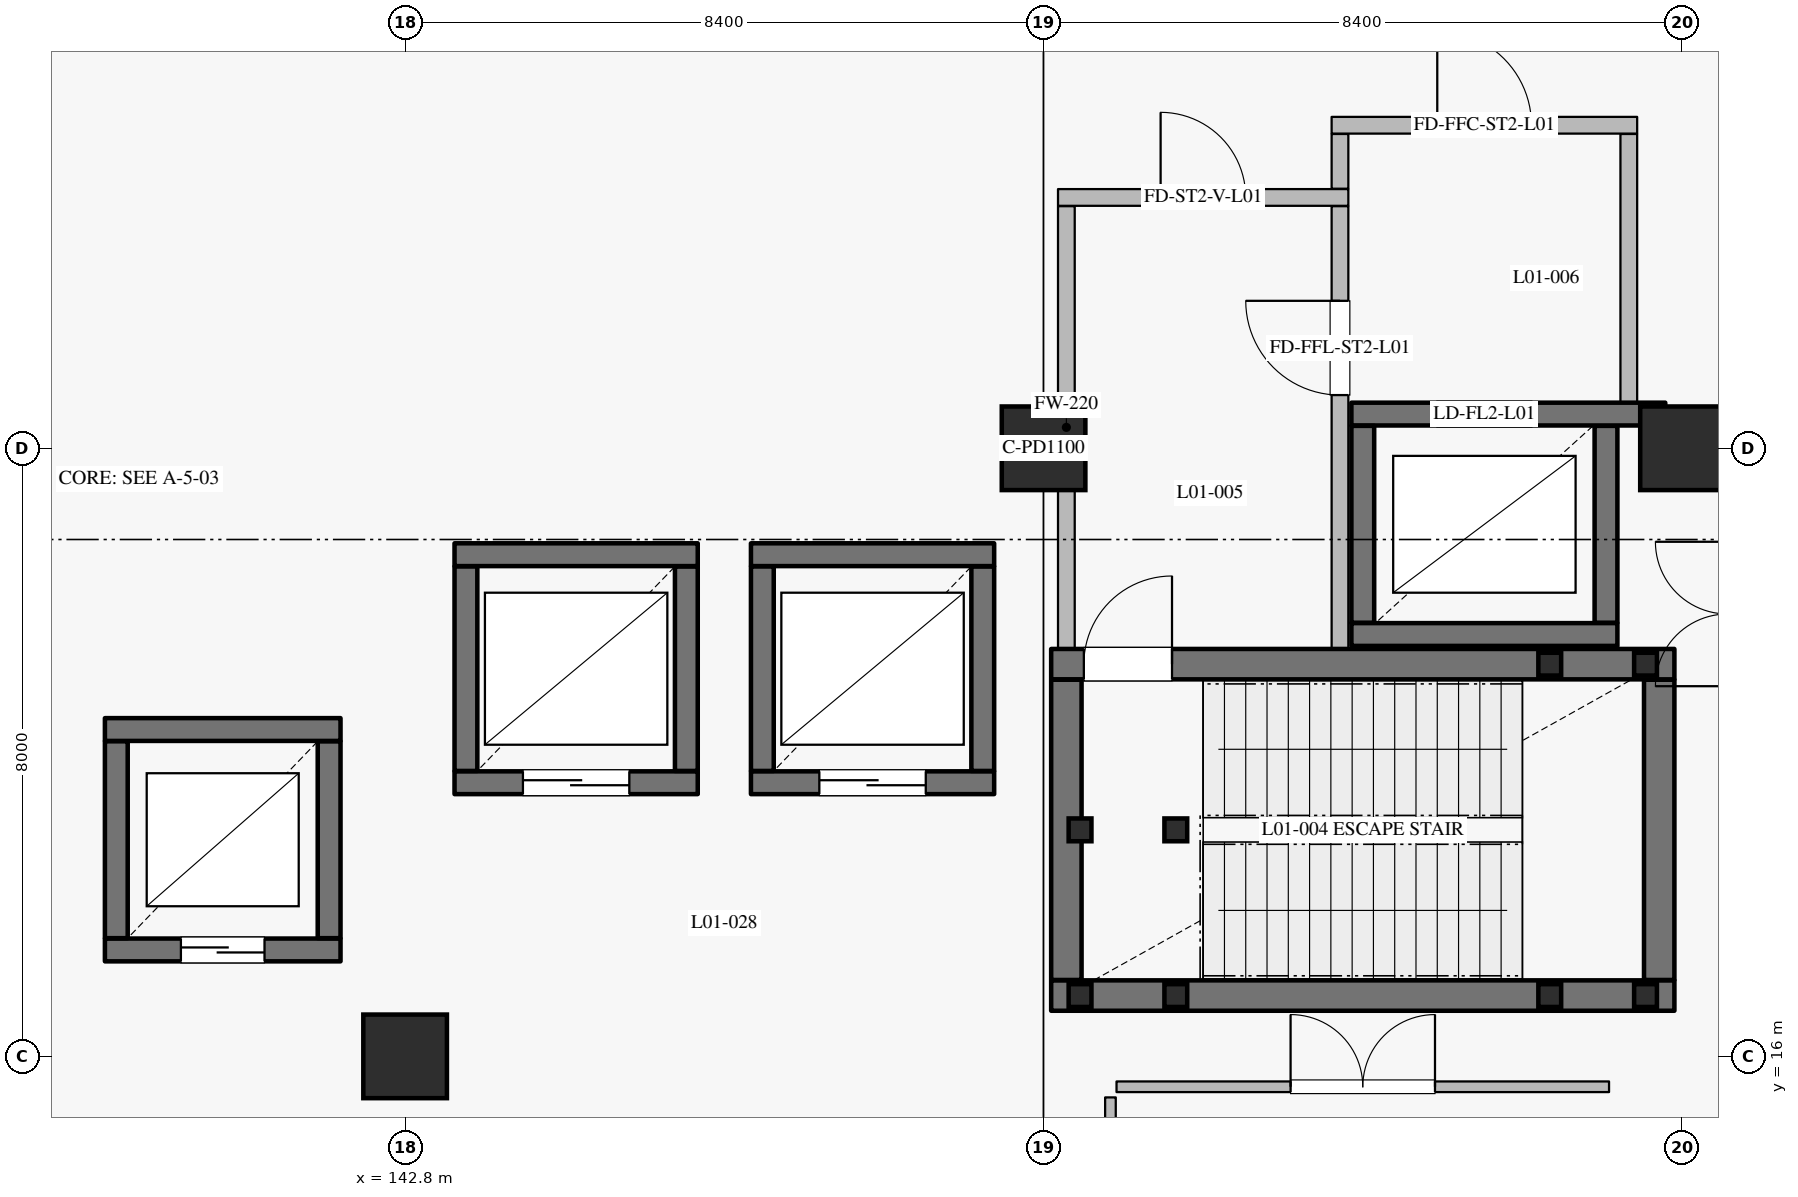
"""IFC4 building model, lengths in metres.
Left out: names, types, materials, properties, quantities, classifications, styles, units other than length and angle.
Written with IfcOpenShell. Run it as: python <this file> out.ifc"""

import sys

from ifc_helpers import new_model, si_unit, direction, frame, frame_2d, origin, origin_2d, place, context, subcontext, project, spatial, rectangle, hollow_rectangle, circle, extrude, element, fill, save


model = new_model("IFC4")
c1 = context("Model", 3, precision=1e-05, world=origin(), true_north=direction((0.0, 1.0)))
c2 = subcontext(c1, "Body", "Model", "MODEL_VIEW")
j1 = project(units=[si_unit("LENGTHUNIT", "METRE"), si_unit("PLANEANGLEUNIT", "RADIAN")], contexts=[c1])
p1 = place(None, origin())
s1 = spatial("IfcSite", under=j1, at=p1, CompositionType="ELEMENT")
p2 = place(p1, origin())
s2 = spatial("IfcBuilding", under=s1, at=p2, CompositionType="ELEMENT")
p3 = place(p2, frame((0.0, 0.0, 6.0)))
s3 = spatial("IfcBuildingStorey", under=s2, at=p3, CompositionType="ELEMENT", Elevation=6.0)
for number, where, z_axis, x_axis in (
    (1, (142.8, 16.0, 0.0), (0.0, 0.0, 1.0), (1.0, 0.0, 0.0)),
    (2, (151.2, 24.0, 0.0), (0.0, 0.0, 1.0), (1.0, 0.0, 0.0)),
    (3, (159.6, 24.0, 0.0), (0.0, 0.0, 1.0), (1.0, 0.0, 0.0)),
):
    element("IfcColumn", number, at=place(p3, frame(where, z_axis=z_axis, x_axis=x_axis)), inside=s3, PredefinedType="COLUMN", context=c2, shape_type="SweptSolid", body=[
        extrude(circle(Radius=0.55, at=origin_2d()), origin(), (0.0, 0.0, 1.0), 5.4),
    ])
p4 = place(p3, frame((138.85, 17.4, 0.0), z_axis=(0.0, 0.0, 1.0), x_axis=(1.0, 0.0, 0.0)))
e4 = element("IfcWall", 4, at=p4, inside=s3, PredefinedType="SHEAR", context=c2, shape_type="SweptSolid", body=[
    extrude(rectangle(XDim=3.1, YDim=0.3, at=frame_2d((1.55, 0.0))), origin(), (0.0, 0.0, 1.0), 5.045),
])
p5 = place(p4, frame((1.0, 0.0, 0.0)))
e5 = element("IfcOpeningElement", 5, at=p5, cuts=e4, PredefinedType="OPENING", context=c2, shape_type="SweptSolid", body=[
    extrude(rectangle(XDim=1.1, YDim=2.2, at=frame_2d((0.55, 1.1))), frame((0.0, 0.16, 0.0), z_axis=(0.0, -1.0, 0.0), x_axis=(1.0, 0.0, 0.0)), (0.0, 0.0, 1.0), 0.32),
])
p6 = place(p3, frame((141.8, 17.555, 0.0), z_axis=(0.0, 0.0, 1.0), x_axis=(0.0, 1.0, 0.0)))
e6 = element("IfcWall", 6, at=p6, inside=s3, PredefinedType="SHEAR", context=c2, shape_type="SweptSolid", body=[
    extrude(rectangle(XDim=2.59, YDim=0.3, at=frame_2d((1.295, 0.0))), origin(), (0.0, 0.0, 1.0), 5.045),
])
p7 = place(p3, frame((141.95, 20.3, 0.0), z_axis=(0.0, 0.0, 1.0), x_axis=(-1.0, 0.0, 0.0)))
e7 = element("IfcWall", 7, at=p7, inside=s3, PredefinedType="SHEAR", context=c2, shape_type="SweptSolid", body=[
    extrude(rectangle(XDim=3.1, YDim=0.3, at=frame_2d((1.55, 0.0))), origin(), (0.0, 0.0, 1.0), 5.045),
])
p8 = place(p3, frame((139.0, 20.145, 0.0), z_axis=(0.0, 0.0, 1.0), x_axis=(0.0, -1.0, 0.0)))
e8 = element("IfcWall", 8, at=p8, inside=s3, PredefinedType="SHEAR", context=c2, shape_type="SweptSolid", body=[
    extrude(rectangle(XDim=2.59, YDim=0.3, at=frame_2d((1.295, 0.0))), origin(), (0.0, 0.0, 1.0), 5.045),
])
p9 = place(p3, frame((155.25, 21.55, 0.0), z_axis=(0.0, 0.0, 1.0), x_axis=(1.0, 0.0, 0.0)))
e9 = element("IfcWall", 9, at=p9, inside=s3, PredefinedType="SHEAR", context=c2, shape_type="SweptSolid", body=[
    extrude(rectangle(XDim=3.5, YDim=0.3, at=frame_2d((1.75, 0.0))), origin(), (0.0, 0.0, 1.0), 5.045),
])
p10 = place(p3, frame((158.6, 21.705, 0.0), z_axis=(0.0, 0.0, 1.0), x_axis=(0.0, 1.0, 0.0)))
e10 = element("IfcWall", 10, at=p10, inside=s3, PredefinedType="SHEAR", context=c2, shape_type="SweptSolid", body=[
    extrude(rectangle(XDim=2.59, YDim=0.3, at=frame_2d((1.295, 0.0))), origin(), (0.0, 0.0, 1.0), 5.045),
])
p11 = place(p3, frame((159.38, 24.45, 0.0), z_axis=(0.0, 0.0, 1.0), x_axis=(-1.0, 0.0, 0.0)))
e11 = element("IfcWall", 11, at=p11, inside=s3, PredefinedType="SHEAR", context=c2, shape_type="SweptSolid", body=[
    extrude(rectangle(XDim=4.13, YDim=0.3, at=frame_2d((2.065, 0.0))), origin(), (0.0, 0.0, 1.0), 5.045),
])
p12 = place(p11, frame((1.755, 0.0, 0.0)))
e12 = element("IfcOpeningElement", 12, at=p12, cuts=e11, PredefinedType="OPENING", context=c2, shape_type="SweptSolid", body=[
    extrude(rectangle(XDim=1.25, YDim=2.25, at=frame_2d((0.625, 1.125))), frame((0.0, 0.16, 0.0), z_axis=(0.0, -1.0, 0.0), x_axis=(1.0, 0.0, 0.0)), (0.0, 0.0, 1.0), 0.32),
])
p13 = place(p3, frame((155.4, 24.295, 0.0), z_axis=(0.0, 0.0, 1.0), x_axis=(0.0, -1.0, 0.0)))
e13 = element("IfcWall", 13, at=p13, inside=s3, PredefinedType="SHEAR", context=c2, shape_type="SweptSolid", body=[
    extrude(rectangle(XDim=2.59, YDim=0.3, at=frame_2d((1.295, 0.0))), origin(), (0.0, 0.0, 1.0), 5.045),
])
p14 = place(p3, frame((143.45, 19.6, 0.0), z_axis=(0.0, 0.0, 1.0), x_axis=(1.0, 0.0, 0.0)))
e14 = element("IfcWall", 14, at=p14, inside=s3, PredefinedType="SHEAR", context=c2, shape_type="SweptSolid", body=[
    extrude(rectangle(XDim=3.2, YDim=0.3, at=frame_2d((1.6, 0.0))), origin(), (0.0, 0.0, 1.0), 5.045),
])
p15 = place(p14, frame((0.9, 0.0, 0.0)))
e15 = element("IfcOpeningElement", 15, at=p15, cuts=e14, PredefinedType="OPENING", context=c2, shape_type="SweptSolid", body=[
    extrude(rectangle(XDim=1.4, YDim=2.35, at=frame_2d((0.7, 1.175))), frame((0.0, 0.16, 0.0), z_axis=(0.0, -1.0, 0.0), x_axis=(1.0, 0.0, 0.0)), (0.0, 0.0, 1.0), 0.32),
])
p16 = place(p3, frame((146.5, 19.755, 0.0), z_axis=(0.0, 0.0, 1.0), x_axis=(0.0, 1.0, 0.0)))
e16 = element("IfcWall", 16, at=p16, inside=s3, PredefinedType="SHEAR", context=c2, shape_type="SweptSolid", body=[
    extrude(rectangle(XDim=2.69, YDim=0.3, at=frame_2d((1.345, 0.0))), origin(), (0.0, 0.0, 1.0), 5.045),
])
p17 = place(p3, frame((146.65, 22.6, 0.0), z_axis=(0.0, 0.0, 1.0), x_axis=(-1.0, 0.0, 0.0)))
e17 = element("IfcWall", 17, at=p17, inside=s3, PredefinedType="SHEAR", context=c2, shape_type="SweptSolid", body=[
    extrude(rectangle(XDim=3.2, YDim=0.3, at=frame_2d((1.6, 0.0))), origin(), (0.0, 0.0, 1.0), 5.045),
])
p18 = place(p3, frame((143.6, 22.445, 0.0), z_axis=(0.0, 0.0, 1.0), x_axis=(0.0, -1.0, 0.0)))
e18 = element("IfcWall", 18, at=p18, inside=s3, PredefinedType="SHEAR", context=c2, shape_type="SweptSolid", body=[
    extrude(rectangle(XDim=2.69, YDim=0.3, at=frame_2d((1.345, 0.0))), origin(), (0.0, 0.0, 1.0), 5.045),
])
p19 = place(p3, frame((147.35, 19.6, 0.0), z_axis=(0.0, 0.0, 1.0), x_axis=(1.0, 0.0, 0.0)))
e19 = element("IfcWall", 19, at=p19, inside=s3, PredefinedType="SHEAR", context=c2, shape_type="SweptSolid", body=[
    extrude(rectangle(XDim=3.2, YDim=0.3, at=frame_2d((1.6, 0.0))), origin(), (0.0, 0.0, 1.0), 5.045),
])
p20 = place(p19, frame((0.9, 0.0, 0.0)))
e20 = element("IfcOpeningElement", 20, at=p20, cuts=e19, PredefinedType="OPENING", context=c2, shape_type="SweptSolid", body=[
    extrude(rectangle(XDim=1.4, YDim=2.35, at=frame_2d((0.7, 1.175))), frame((0.0, 0.16, 0.0), z_axis=(0.0, -1.0, 0.0), x_axis=(1.0, 0.0, 0.0)), (0.0, 0.0, 1.0), 0.32),
])
p21 = place(p3, frame((150.4, 19.755, 0.0), z_axis=(0.0, 0.0, 1.0), x_axis=(0.0, 1.0, 0.0)))
e21 = element("IfcWall", 21, at=p21, inside=s3, PredefinedType="SHEAR", context=c2, shape_type="SweptSolid", body=[
    extrude(rectangle(XDim=2.69, YDim=0.3, at=frame_2d((1.345, 0.0))), origin(), (0.0, 0.0, 1.0), 5.045),
])
p22 = place(p3, frame((150.55, 22.6, 0.0), z_axis=(0.0, 0.0, 1.0), x_axis=(-1.0, 0.0, 0.0)))
e22 = element("IfcWall", 22, at=p22, inside=s3, PredefinedType="SHEAR", context=c2, shape_type="SweptSolid", body=[
    extrude(rectangle(XDim=3.2, YDim=0.3, at=frame_2d((1.6, 0.0))), origin(), (0.0, 0.0, 1.0), 5.045),
])
p23 = place(p3, frame((147.5, 22.445, 0.0), z_axis=(0.0, 0.0, 1.0), x_axis=(0.0, -1.0, 0.0)))
e23 = element("IfcWall", 23, at=p23, inside=s3, PredefinedType="SHEAR", context=c2, shape_type="SweptSolid", body=[
    extrude(rectangle(XDim=2.69, YDim=0.3, at=frame_2d((1.345, 0.0))), origin(), (0.0, 0.0, 1.0), 5.045),
])
p24 = place(p3, frame((151.3, 16.8, 0.0), z_axis=(0.0, 0.0, 1.0), x_axis=(1.0, 0.0, 0.0)))
e24 = element("IfcWall", 24, at=p24, inside=s3, PredefinedType="SHEAR", context=c2, shape_type="SweptSolid", body=[
    extrude(rectangle(XDim=8.2, YDim=0.4, at=frame_2d((4.1, 0.0))), origin(), (0.0, 0.0, 1.0), 5.045),
])
p25 = place(p3, frame((159.3, 17.005, 0.0), z_axis=(0.0, 0.0, 1.0), x_axis=(0.0, 1.0, 0.0)))
e25 = element("IfcWall", 25, at=p25, inside=s3, PredefinedType="SHEAR", context=c2, shape_type="SweptSolid", body=[
    extrude(rectangle(XDim=3.95, YDim=0.4, at=frame_2d((1.975, 0.0))), origin(), (0.0, 0.0, 1.0), 5.045),
])
p26 = place(p3, frame((151.3, 21.16, 0.0), z_axis=(0.0, 0.0, 1.0), x_axis=(1.0, 0.0, 0.0)))
e26 = element("IfcWall", 26, at=p26, inside=s3, PredefinedType="SHEAR", context=c2, shape_type="SweptSolid", body=[
    extrude(rectangle(XDim=8.2, YDim=0.4, at=frame_2d((4.1, 0.0))), origin(), (0.0, 0.0, 1.0), 5.045),
])
p27 = place(p26, frame((0.43, 0.0, 0.0)))
e27 = element("IfcOpeningElement", 27, at=p27, cuts=e26, PredefinedType="OPENING", context=c2, shape_type="SweptSolid", body=[
    extrude(rectangle(XDim=1.16, YDim=2.2, at=frame_2d((0.58, 1.1))), frame((0.0, 0.21, 0.0), z_axis=(0.0, -1.0, 0.0), x_axis=(1.0, 0.0, 0.0)), (0.0, 0.0, 1.0), 0.42),
])
p28 = place(p3, frame((151.5, 17.005, 0.0), z_axis=(0.0, 0.0, 1.0), x_axis=(0.0, 1.0, 0.0)))
e28 = element("IfcWall", 28, at=p28, inside=s3, PredefinedType="SHEAR", context=c2, shape_type="SweptSolid", body=[
    extrude(rectangle(XDim=3.95, YDim=0.4, at=frame_2d((1.975, 0.0))), origin(), (0.0, 0.0, 1.0), 5.045),
])
p29 = place(p3, frame((151.5, 21.365, 0.0), z_axis=(0.0, 0.0, 1.0), x_axis=(0.0, 1.0, 0.0)))
e29 = element("IfcWall", 29, at=p29, inside=s3, PredefinedType="PARTITIONING", context=c2, shape_type="SweptSolid", body=[
    extrude(rectangle(XDim=5.82, YDim=0.22, at=frame_2d((2.91, 0.0))), origin(), (0.0, 0.0, 1.0), 3.45),
])
p30 = place(p3, frame((151.39, 27.3, 0.0), z_axis=(0.0, 0.0, 1.0), x_axis=(1.0, 0.0, 0.0)))
e30 = element("IfcWall", 30, at=p30, inside=s3, PredefinedType="PARTITIONING", context=c2, shape_type="SweptSolid", body=[
    extrude(rectangle(XDim=3.82, YDim=0.22, at=frame_2d((1.91, 0.0))), origin(), (0.0, 0.0, 1.0), 5.045),
])
p31 = place(p30, frame((1.35, 0.0, 0.0)))
e31 = element("IfcOpeningElement", 31, at=p31, cuts=e30, PredefinedType="OPENING", context=c2, shape_type="SweptSolid", body=[
    extrude(rectangle(XDim=1.12, YDim=2.2, at=frame_2d((0.56, 1.1))), frame((0.0, 0.12, 0.0), z_axis=(0.0, -1.0, 0.0), x_axis=(1.0, 0.0, 0.0)), (0.0, 0.0, 1.0), 0.24),
])
p32 = place(p3, frame((155.1, 21.365, 0.0), z_axis=(0.0, 0.0, 1.0), x_axis=(0.0, 1.0, 0.0)))
e32 = element("IfcWall", 32, at=p32, inside=s3, PredefinedType="PARTITIONING", context=c2, shape_type="SweptSolid", body=[
    extrude(rectangle(XDim=5.82, YDim=0.22, at=frame_2d((2.91, 0.0))), origin(), (0.0, 0.0, 1.0), 5.045),
])
p33 = place(p32, frame((3.335, 0.0, 0.0)))
e33 = element("IfcOpeningElement", 33, at=p33, cuts=e32, PredefinedType="OPENING", context=c2, shape_type="SweptSolid", body=[
    extrude(rectangle(XDim=1.24, YDim=2.2, at=frame_2d((0.62, 1.1))), frame((0.0, 0.12, 0.0), z_axis=(0.0, -1.0, 0.0), x_axis=(1.0, 0.0, 0.0)), (0.0, 0.0, 1.0), 0.24),
])
p34 = place(p3, frame((155.1, 27.415, 0.0), z_axis=(0.0, 0.0, 1.0), x_axis=(0.0, 1.0, 0.0)))
e34 = element("IfcWall", 34, at=p34, inside=s3, PredefinedType="PARTITIONING", context=c2, shape_type="SweptSolid", body=[
    extrude(rectangle(XDim=0.72, YDim=0.22, at=frame_2d((0.36, 0.0))), origin(), (0.0, 0.0, 1.0), 5.045),
])
p35 = place(p3, frame((158.9, 24.605, 0.0), z_axis=(0.0, 0.0, 1.0), x_axis=(0.0, 1.0, 0.0)))
e35 = element("IfcWall", 35, at=p35, inside=s3, PredefinedType="PARTITIONING", context=c2, shape_type="SweptSolid", body=[
    extrude(rectangle(XDim=3.53, YDim=0.22, at=frame_2d((1.765, 0.0))), origin(), (0.0, 0.0, 1.0), 5.045),
])
p36 = place(p3, frame((154.99, 28.25, 0.0), z_axis=(0.0, 0.0, 1.0), x_axis=(1.0, 0.0, 0.0)))
e36 = element("IfcWall", 36, at=p36, inside=s3, PredefinedType="PARTITIONING", context=c2, shape_type="SweptSolid", body=[
    extrude(rectangle(XDim=4.02, YDim=0.22, at=frame_2d((2.01, 0.0))), origin(), (0.0, 0.0, 1.0), 5.045),
])
p37 = place(p36, frame((1.39, 0.0, 0.0)))
e37 = element("IfcOpeningElement", 37, at=p37, cuts=e36, PredefinedType="OPENING", context=c2, shape_type="SweptSolid", body=[
    extrude(rectangle(XDim=1.24, YDim=2.2, at=frame_2d((0.62, 1.1))), frame((0.0, 0.12, 0.0), z_axis=(0.0, -1.0, 0.0), x_axis=(1.0, 0.0, 0.0)), (0.0, 0.0, 1.0), 0.24),
])
for number, where, z_axis, x_axis in (
    (38, (151.68, 16.8, 0.0), (0.0, 0.0, 1.0), (1.0, 0.0, 0.0)),
    (39, (151.68, 18.98, 0.0), (0.0, 0.0, 1.0), (1.0, 0.0, 0.0)),
    (40, (152.94, 16.8, 0.0), (0.0, 0.0, 1.0), (1.0, 0.0, 0.0)),
    (41, (152.94, 18.98, 0.0), (0.0, 0.0, 1.0), (1.0, 0.0, 0.0)),
):
    element("IfcColumn", number, at=place(p3, frame(where, z_axis=z_axis, x_axis=x_axis)), inside=s3, PredefinedType="COLUMN", context=c2, shape_type="SweptSolid", body=[
        extrude(hollow_rectangle(XDim=0.3, YDim=0.3, WallThickness=0.012, at=origin_2d()), origin(), (0.0, 0.0, 1.0), 5.22),
    ])
for number, where, z_axis, x_axis in (
    (42, (157.86, 16.8, -3.0), (0.0, 0.0, 1.0), (1.0, 0.0, 0.0)),
    (43, (157.86, 21.16, -3.0), (0.0, 0.0, 1.0), (1.0, 0.0, 0.0)),
    (44, (159.12, 16.8, -3.0), (0.0, 0.0, 1.0), (1.0, 0.0, 0.0)),
    (45, (159.12, 21.16, -3.0), (0.0, 0.0, 1.0), (1.0, 0.0, 0.0)),
):
    element("IfcColumn", number, at=place(p3, frame(where, z_axis=z_axis, x_axis=x_axis)), inside=s3, PredefinedType="COLUMN", context=c2, shape_type="SweptSolid", body=[
        extrude(hollow_rectangle(XDim=0.3, YDim=0.3, WallThickness=0.012, at=origin_2d()), origin(), (0.0, 0.0, 1.0), 5.52),
    ])
p38 = place(p3, frame((152.16, 15.6, 0.0), z_axis=(0.0, 0.0, 1.0), x_axis=(1.0, 0.0, 0.0)))
e46 = element("IfcWall", 46, at=p38, inside=s3, PredefinedType="PARTITIONING", context=c2, shape_type="SweptSolid", body=[
    extrude(rectangle(XDim=6.48, YDim=0.14, at=frame_2d((3.24, 0.0))), origin(), (0.0, 0.0, 1.0), 5.045),
])
p39 = place(p38, frame((2.29, 0.0, 0.0)))
e47 = element("IfcOpeningElement", 47, at=p39, cuts=e46, PredefinedType="OPENING", context=c2, shape_type="SweptSolid", body=[
    extrude(rectangle(XDim=1.9, YDim=2.4, at=frame_2d((0.95, 1.2))), frame((0.0, 0.08, 0.0), z_axis=(0.0, -1.0, 0.0), x_axis=(1.0, 0.0, 0.0)), (0.0, 0.0, 1.0), 0.16),
])
p40 = place(p3, frame((152.08, 9.45, 0.0), z_axis=(0.0, 0.0, 1.0), x_axis=(0.0, 1.0, 0.0)))
e48 = element("IfcWall", 48, at=p40, inside=s3, PredefinedType="PARTITIONING", context=c2, shape_type="SweptSolid", body=[
    extrude(rectangle(XDim=6.01, YDim=0.14, at=frame_2d((3.005, 0.0))), origin(), (0.0, 0.0, 1.0), 5.045),
])
p41 = place(p5, origin())
e49 = element("IfcDoor", 49, at=p41, inside=s3, OperationType="DOUBLE_DOOR_SLIDING", PredefinedType="DOOR", context=c2, shape_type="SweptSolid", body=[
    extrude(rectangle(XDim=1.1, YDim=2.2, at=frame_2d((0.55, 1.1))), frame((0.0, 0.025, 0.0), z_axis=(0.0, -1.0, 0.0), x_axis=(1.0, 0.0, 0.0)), (0.0, 0.0, 1.0), 0.05),
])
fill(e5, e49)
p42 = place(p12, origin())
e50 = element("IfcDoor", 50, at=p42, inside=s3, OperationType="DOUBLE_DOOR_SLIDING", PredefinedType="DOOR", context=c2, shape_type="SweptSolid", body=[
    extrude(rectangle(XDim=1.25, YDim=2.25, at=frame_2d((0.625, 1.125))), frame((0.0, 0.025, 0.0), z_axis=(0.0, -1.0, 0.0), x_axis=(1.0, 0.0, 0.0)), (0.0, 0.0, 1.0), 0.05),
])
fill(e12, e50)
p43 = place(p15, origin())
e51 = element("IfcDoor", 51, at=p43, inside=s3, OperationType="DOUBLE_DOOR_SLIDING", PredefinedType="DOOR", context=c2, shape_type="SweptSolid", body=[
    extrude(rectangle(XDim=1.4, YDim=2.35, at=frame_2d((0.7, 1.175))), frame((0.0, 0.025, 0.0), z_axis=(0.0, -1.0, 0.0), x_axis=(1.0, 0.0, 0.0)), (0.0, 0.0, 1.0), 0.05),
])
fill(e15, e51)
p44 = place(p20, origin())
e52 = element("IfcDoor", 52, at=p44, inside=s3, OperationType="DOUBLE_DOOR_SLIDING", PredefinedType="DOOR", context=c2, shape_type="SweptSolid", body=[
    extrude(rectangle(XDim=1.4, YDim=2.35, at=frame_2d((0.7, 1.175))), frame((0.0, 0.025, 0.0), z_axis=(0.0, -1.0, 0.0), x_axis=(1.0, 0.0, 0.0)), (0.0, 0.0, 1.0), 0.05),
])
fill(e20, e52)
p45 = place(p27, origin())
e53 = element("IfcDoor", 53, at=p45, inside=s3, OperationType="SINGLE_SWING_RIGHT", PredefinedType="DOOR", context=c2, shape_type="SweptSolid", body=[
    extrude(rectangle(XDim=1.16, YDim=2.2, at=frame_2d((0.58, 1.1))), frame((0.0, 0.025, 0.0), z_axis=(0.0, -1.0, 0.0), x_axis=(1.0, 0.0, 0.0)), (0.0, 0.0, 1.0), 0.05),
])
fill(e27, e53)
p46 = place(p31, origin())
e54 = element("IfcDoor", 54, at=p46, inside=s3, OperationType="SINGLE_SWING_LEFT", PredefinedType="DOOR", context=c2, shape_type="SweptSolid", body=[
    extrude(rectangle(XDim=1.12, YDim=2.2, at=frame_2d((0.56, 1.1))), frame((0.0, 0.025, 0.0), z_axis=(0.0, -1.0, 0.0), x_axis=(1.0, 0.0, 0.0)), (0.0, 0.0, 1.0), 0.05),
])
fill(e31, e54)
p47 = place(p33, origin())
e55 = element("IfcDoor", 55, at=p47, inside=s3, OperationType="SINGLE_SWING_RIGHT", PredefinedType="DOOR", context=c2, shape_type="SweptSolid", body=[
    extrude(rectangle(XDim=1.24, YDim=2.2, at=frame_2d((0.62, 1.1))), frame((0.0, 0.025, 0.0), z_axis=(0.0, -1.0, 0.0), x_axis=(1.0, 0.0, 0.0)), (0.0, 0.0, 1.0), 0.05),
])
fill(e33, e55)
p48 = place(p37, origin())
e56 = element("IfcDoor", 56, at=p48, inside=s3, OperationType="SINGLE_SWING_LEFT", PredefinedType="DOOR", context=c2, shape_type="SweptSolid", body=[
    extrude(rectangle(XDim=1.24, YDim=2.2, at=frame_2d((0.62, 1.1))), frame((0.0, 0.025, 0.0), z_axis=(0.0, -1.0, 0.0), x_axis=(1.0, 0.0, 0.0)), (0.0, 0.0, 1.0), 0.05),
])
fill(e37, e56)
p49 = place(p39, origin())
e57 = element("IfcDoor", 57, at=p49, inside=s3, OperationType="DOUBLE_DOOR_SINGLE_SWING", PredefinedType="DOOR", context=c2, shape_type="SweptSolid", body=[
    extrude(rectangle(XDim=1.9, YDim=2.4, at=frame_2d((0.95, 1.2))), frame((0.0, 0.025, 0.0), z_axis=(0.0, -1.0, 0.0), x_axis=(1.0, 0.0, 0.0)), (0.0, 0.0, 1.0), 0.05),
])
fill(e47, e57)
save(model, sys.argv[1])
